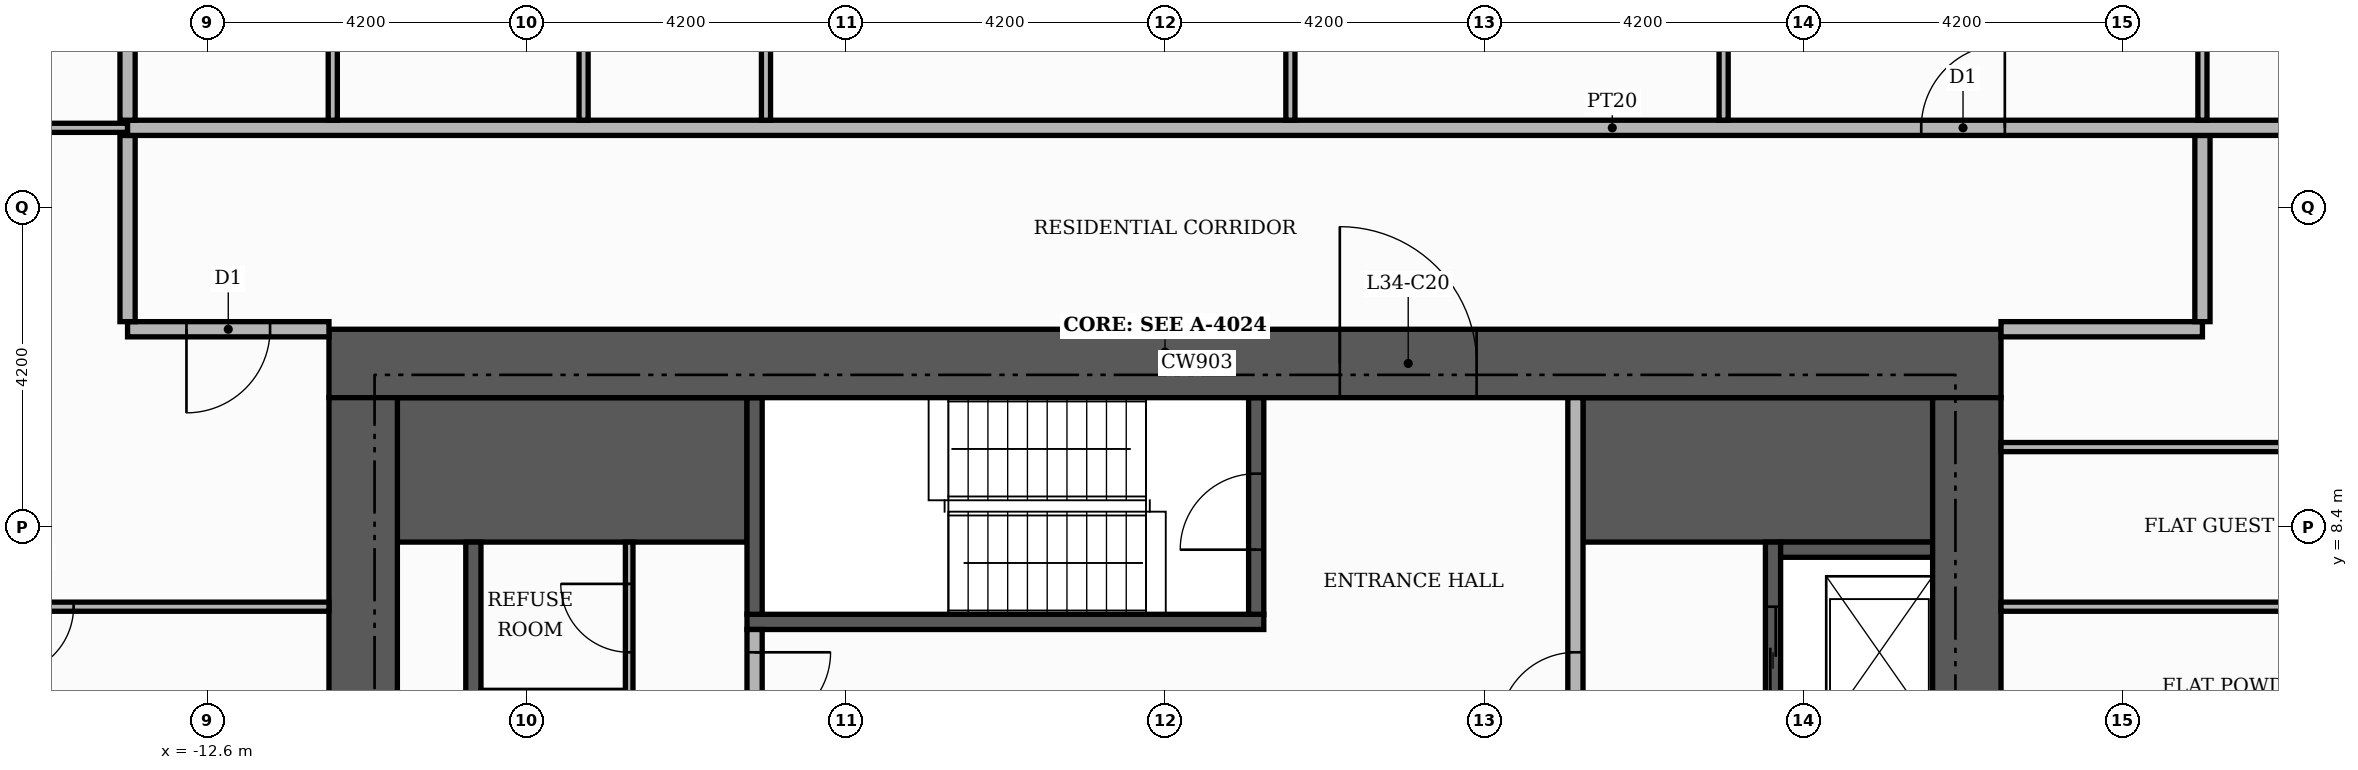
"""IFC4 building model, lengths in metres.
Left out: names, types, materials, properties, quantities, classifications, styles, units other than length and angle.
Written with IfcOpenShell. Run it as: python <this file> out.ifc"""

import sys

from ifc_helpers import new_model, si_unit, direction, frame, frame_2d, origin, place, context, subcontext, project, spatial, rectangle, extrude, element, fill, save


model = new_model("IFC4")
c1 = context("Model", 3, precision=1e-05, world=origin(), true_north=direction((0.0, 1.0)))
c2 = subcontext(c1, "Body", "Model", "MODEL_VIEW")
j1 = project(units=[si_unit("LENGTHUNIT", "METRE"), si_unit("PLANEANGLEUNIT", "RADIAN")], contexts=[c1])
p1 = place(None, origin())
s1 = spatial("IfcSite", under=j1, at=p1, CompositionType="ELEMENT")
p2 = place(p1, origin())
s2 = spatial("IfcBuilding", under=s1, at=p2, CompositionType="ELEMENT")
p3 = place(p2, frame((0.0, 0.0, 145.5)))
s3 = spatial("IfcBuildingStorey", under=s2, at=p3, CompositionType="ELEMENT", Elevation=145.5)
for number, where, z_axis, x_axis in (
    (1, (-10.1, 9.15, 0.0), (0.0, 0.0, 1.0), (1.0, 0.0, 0.0)),
    (2, (5.5, 9.15, 0.0), (0.0, 0.0, 1.0), (1.0, 0.0, 0.0)),
):
    element("IfcWall", number, at=place(p3, frame(where, z_axis=z_axis, x_axis=x_axis)), inside=s3, PredefinedType="SHEAR", context=c2, shape_type="SweptSolid", body=[
        extrude(rectangle(XDim=4.6, YDim=1.9, at=frame_2d((2.3, 0.0))), origin(), (0.0, 0.0, 1.0), 3.48),
    ])
p4 = place(p3, frame((-5.5, 7.15, 0.0), z_axis=(0.0, 0.0, 1.0), x_axis=(1.0, 0.0, 0.0)))
e3 = element("IfcWall", 3, at=p4, inside=s3, PredefinedType="SHEAR", context=c2, shape_type="SweptSolid", body=[
    extrude(rectangle(XDim=6.8, YDim=0.2, at=frame_2d((3.4, 0.0))), origin(), (0.0, 0.0, 1.0), 3.48),
])
p5 = place(p3, frame((-5.4, 7.25, 0.0), z_axis=(0.0, 0.0, 1.0), x_axis=(0.0, 1.0, 0.0)))
e4 = element("IfcWall", 4, at=p5, inside=s3, PredefinedType="SHEAR", context=c2, shape_type="SweptSolid", body=[
    extrude(rectangle(XDim=2.85, YDim=0.2, at=frame_2d((1.425, 0.0))), origin(), (0.0, 0.0, 1.0), 3.48),
])
p6 = place(p3, frame((1.2, 7.25, 0.0), z_axis=(0.0, 0.0, 1.0), x_axis=(0.0, 1.0, 0.0)))
e5 = element("IfcWall", 5, at=p6, inside=s3, PredefinedType="SHEAR", context=c2, shape_type="SweptSolid", body=[
    extrude(rectangle(XDim=2.85, YDim=0.2, at=frame_2d((1.425, 0.0))), origin(), (0.0, 0.0, 1.0), 3.48),
])
p7 = place(p6, frame((0.85, 0.0, 0.0)))
e6 = element("IfcOpeningElement", 6, at=p7, cuts=e5, PredefinedType="OPENING", context=c2, shape_type="SweptSolid", body=[
    extrude(rectangle(XDim=1.0, YDim=2.1, at=frame_2d((0.5, 1.05))), frame((0.0, 0.11, 0.0), z_axis=(0.0, -1.0, 0.0), x_axis=(1.0, 0.0, 0.0)), (0.0, 0.0, 1.0), 0.22),
])
p8 = place(p3, frame((-9.1, -8.2, 0.0), z_axis=(0.0, 0.0, 1.0), x_axis=(0.0, 1.0, 0.0)))
e7 = element("IfcWall", 7, at=p8, inside=s3, PredefinedType="SHEAR", context=c2, shape_type="SweptSolid", body=[
    extrude(rectangle(XDim=16.4, YDim=0.2, at=frame_2d((8.2, 0.0))), origin(), (0.0, 0.0, 1.0), 3.48),
])
p9 = place(p3, frame((8.0, -8.2, 0.0), z_axis=(0.0, 0.0, 1.0), x_axis=(0.0, 1.0, 0.0)))
e8 = element("IfcWall", 8, at=p9, inside=s3, PredefinedType="SHEAR", context=c2, shape_type="SweptSolid", body=[
    extrude(rectangle(XDim=16.4, YDim=0.2, at=frame_2d((8.2, 0.0))), origin(), (0.0, 0.0, 1.0), 3.48),
])
p10 = place(p9, frame((0.85, 0.0, 0.0)))
e9 = element("IfcOpeningElement", 9, at=p10, cuts=e8, PredefinedType="OPENING", context=c2, shape_type="SweptSolid", body=[
    extrude(rectangle(XDim=1.2, YDim=2.1, at=frame_2d((0.6, 1.05))), frame((0.0, 0.11, 0.0), z_axis=(0.0, -1.0, 0.0), x_axis=(1.0, 0.0, 0.0)), (0.0, 0.0, 1.0), 0.22),
])
p11 = place(p9, frame((3.55, 0.0, 0.0)))
e10 = element("IfcOpeningElement", 10, at=p11, cuts=e8, PredefinedType="OPENING", context=c2, shape_type="SweptSolid", body=[
    extrude(rectangle(XDim=1.2, YDim=2.1, at=frame_2d((0.6, 1.05))), frame((0.0, 0.11, 0.0), z_axis=(0.0, -1.0, 0.0), x_axis=(1.0, 0.0, 0.0)), (0.0, 0.0, 1.0), 0.22),
])
p12 = place(p9, frame((6.25, 0.0, 0.0)))
e11 = element("IfcOpeningElement", 11, at=p12, cuts=e8, PredefinedType="OPENING", context=c2, shape_type="SweptSolid", body=[
    extrude(rectangle(XDim=1.2, YDim=2.1, at=frame_2d((0.6, 1.05))), frame((0.0, 0.11, 0.0), z_axis=(0.0, -1.0, 0.0), x_axis=(1.0, 0.0, 0.0)), (0.0, 0.0, 1.0), 0.22),
])
p13 = place(p9, frame((8.95, 0.0, 0.0)))
e12 = element("IfcOpeningElement", 12, at=p13, cuts=e8, PredefinedType="OPENING", context=c2, shape_type="SweptSolid", body=[
    extrude(rectangle(XDim=1.2, YDim=2.1, at=frame_2d((0.6, 1.05))), frame((0.0, 0.11, 0.0), z_axis=(0.0, -1.0, 0.0), x_axis=(1.0, 0.0, 0.0)), (0.0, 0.0, 1.0), 0.22),
])
p14 = place(p9, frame((11.65, 0.0, 0.0)))
e13 = element("IfcOpeningElement", 13, at=p14, cuts=e8, PredefinedType="OPENING", context=c2, shape_type="SweptSolid", body=[
    extrude(rectangle(XDim=1.2, YDim=2.1, at=frame_2d((0.6, 1.05))), frame((0.0, 0.11, 0.0), z_axis=(0.0, -1.0, 0.0), x_axis=(1.0, 0.0, 0.0)), (0.0, 0.0, 1.0), 0.22),
])
p15 = place(p9, frame((14.35, 0.0, 0.0)))
e14 = element("IfcOpeningElement", 14, at=p15, cuts=e8, PredefinedType="OPENING", context=c2, shape_type="SweptSolid", body=[
    extrude(rectangle(XDim=1.2, YDim=2.1, at=frame_2d((0.6, 1.05))), frame((0.0, 0.11, 0.0), z_axis=(0.0, -1.0, 0.0), x_axis=(1.0, 0.0, 0.0)), (0.0, 0.0, 1.0), 0.22),
])
p16 = place(p3, frame((8.1, 8.1, 0.0), z_axis=(0.0, 0.0, 1.0), x_axis=(1.0, 0.0, 0.0)))
e15 = element("IfcWall", 15, at=p16, inside=s3, PredefinedType="SHEAR", context=c2, shape_type="SweptSolid", body=[
    extrude(rectangle(XDim=2.0, YDim=0.2, at=frame_2d((1.0, 0.0))), origin(), (0.0, 0.0, 1.0), 3.48),
])
p17 = place(p3, frame((-11.0, 10.55, 0.0), z_axis=(0.0, 0.0, 1.0), x_axis=(1.0, 0.0, 0.0)))
e16 = element("IfcWall", 16, at=p17, inside=s3, PredefinedType="SHEAR", context=c2, shape_type="SweptSolid", body=[
    extrude(rectangle(XDim=22.0, YDim=0.9, at=frame_2d((11.0, 0.0))), origin(), (0.0, 0.0, 1.0), 3.48),
])
p18 = place(p17, frame((13.3, 0.0, 0.0)))
e17 = element("IfcOpeningElement", 17, at=p18, cuts=e16, PredefinedType="OPENING", context=c2, shape_type="SweptSolid", body=[
    extrude(rectangle(XDim=1.8, YDim=2.2, at=frame_2d((0.9, 1.1))), frame((0.0, 0.46, 0.0), z_axis=(0.0, -1.0, 0.0), x_axis=(1.0, 0.0, 0.0)), (0.0, 0.0, 1.0), 0.92),
])
for number, where, z_axis, x_axis in (
    (18, (-10.55, -10.1, 0.0), (0.0, 0.0, 1.0), (0.0, 1.0, 0.0)),
    (19, (10.55, -10.1, 0.0), (0.0, 0.0, 1.0), (0.0, 1.0, 0.0)),
):
    element("IfcWall", number, at=place(p3, frame(where, z_axis=z_axis, x_axis=x_axis)), inside=s3, PredefinedType="SHEAR", context=c2, shape_type="SweptSolid", body=[
        extrude(rectangle(XDim=20.2, YDim=0.9, at=frame_2d((10.1, 0.0))), origin(), (0.0, 0.0, 1.0), 3.48),
    ])
p19 = place(p3, frame((-7.05, -8.2, 0.0), z_axis=(0.0, 0.0, 1.0), x_axis=(0.0, 1.0, 0.0)))
e20 = element("IfcWall", 20, at=p19, inside=s3, PredefinedType="PARTITIONING", context=c2, shape_type="SweptSolid", body=[
    extrude(rectangle(XDim=16.4, YDim=0.1, at=frame_2d((8.2, 0.0))), origin(), (0.0, 0.0, 1.0), 3.48),
])
p20 = place(p19, frame((0.5, 0.0, 0.0)))
e21 = element("IfcOpeningElement", 21, at=p20, cuts=e20, PredefinedType="OPENING", context=c2, shape_type="SweptSolid", body=[
    extrude(rectangle(XDim=1.0, YDim=2.1, at=frame_2d((0.5, 1.05))), frame((0.0, 0.06, 0.0), z_axis=(0.0, -1.0, 0.0), x_axis=(1.0, 0.0, 0.0)), (0.0, 0.0, 1.0), 0.12),
])
p21 = place(p19, frame((3.25, 0.0, 0.0)))
e22 = element("IfcOpeningElement", 22, at=p21, cuts=e20, PredefinedType="OPENING", context=c2, shape_type="SweptSolid", body=[
    extrude(rectangle(XDim=0.9, YDim=2.1, at=frame_2d((0.45, 1.05))), frame((0.0, 0.06, 0.0), z_axis=(0.0, -1.0, 0.0), x_axis=(1.0, 0.0, 0.0)), (0.0, 0.0, 1.0), 0.12),
])
p22 = place(p19, frame((6.65, 0.0, 0.0)))
e23 = element("IfcOpeningElement", 23, at=p22, cuts=e20, PredefinedType="OPENING", context=c2, shape_type="SweptSolid", body=[
    extrude(rectangle(XDim=0.9, YDim=2.1, at=frame_2d((0.45, 1.05))), frame((0.0, 0.06, 0.0), z_axis=(0.0, -1.0, 0.0), x_axis=(1.0, 0.0, 0.0)), (0.0, 0.0, 1.0), 0.12),
])
p23 = place(p19, frame((10.15, 0.0, 0.0)))
e24 = element("IfcOpeningElement", 24, at=p23, cuts=e20, PredefinedType="OPENING", context=c2, shape_type="SweptSolid", body=[
    extrude(rectangle(XDim=0.9, YDim=2.1, at=frame_2d((0.45, 1.05))), frame((0.0, 0.06, 0.0), z_axis=(0.0, -1.0, 0.0), x_axis=(1.0, 0.0, 0.0)), (0.0, 0.0, 1.0), 0.12),
])
p24 = place(p19, frame((12.95, 0.0, 0.0)))
e25 = element("IfcOpeningElement", 25, at=p24, cuts=e20, PredefinedType="OPENING", context=c2, shape_type="SweptSolid", body=[
    extrude(rectangle(XDim=0.9, YDim=2.1, at=frame_2d((0.45, 1.05))), frame((0.0, 0.06, 0.0), z_axis=(0.0, -1.0, 0.0), x_axis=(1.0, 0.0, 0.0)), (0.0, 0.0, 1.0), 0.12),
])
p25 = place(p19, frame((14.95, 0.0, 0.0)))
e26 = element("IfcOpeningElement", 26, at=p25, cuts=e20, PredefinedType="OPENING", context=c2, shape_type="SweptSolid", body=[
    extrude(rectangle(XDim=0.9, YDim=2.1, at=frame_2d((0.45, 1.05))), frame((0.0, 0.06, 0.0), z_axis=(0.0, -1.0, 0.0), x_axis=(1.0, 0.0, 0.0)), (0.0, 0.0, 1.0), 0.12),
])
p26 = place(p3, frame((-5.4, 5.5, 0.0), z_axis=(0.0, 0.0, 1.0), x_axis=(0.0, 1.0, 0.0)))
e27 = element("IfcWall", 27, at=p26, inside=s3, PredefinedType="PARTITIONING", context=c2, shape_type="SweptSolid", body=[
    extrude(rectangle(XDim=1.55, YDim=0.2, at=frame_2d((0.775, 0.0))), origin(), (0.0, 0.0, 1.0), 3.48),
])
p27 = place(p26, frame((0.25, 0.0, 0.0)))
e28 = element("IfcOpeningElement", 28, at=p27, cuts=e27, PredefinedType="OPENING", context=c2, shape_type="SweptSolid", body=[
    extrude(rectangle(XDim=1.0, YDim=2.1, at=frame_2d((0.5, 1.05))), frame((0.0, 0.11, 0.0), z_axis=(0.0, -1.0, 0.0), x_axis=(1.0, 0.0, 0.0)), (0.0, 0.0, 1.0), 0.22),
])
p28 = place(p3, frame((5.4, 5.5, 0.0), z_axis=(0.0, 0.0, 1.0), x_axis=(0.0, 1.0, 0.0)))
e29 = element("IfcWall", 29, at=p28, inside=s3, PredefinedType="PARTITIONING", context=c2, shape_type="SweptSolid", body=[
    extrude(rectangle(XDim=4.6, YDim=0.2, at=frame_2d((2.3, 0.0))), origin(), (0.0, 0.0, 1.0), 3.48),
])
p29 = place(p28, frame((0.25, 0.0, 0.0)))
e30 = element("IfcOpeningElement", 30, at=p29, cuts=e29, PredefinedType="OPENING", context=c2, shape_type="SweptSolid", body=[
    extrude(rectangle(XDim=1.0, YDim=2.1, at=frame_2d((0.5, 1.05))), frame((0.0, 0.11, 0.0), z_axis=(0.0, -1.0, 0.0), x_axis=(1.0, 0.0, 0.0)), (0.0, 0.0, 1.0), 0.22),
])
p30 = place(p3, frame((-18.62, 7.35, 0.0), z_axis=(0.0, 0.0, 1.0), x_axis=(1.0, 0.0, 0.0)))
e31 = element("IfcWall", 31, at=p30, inside=s3, PredefinedType="PARTITIONING", context=c2, shape_type="SweptSolid", body=[
    extrude(rectangle(XDim=7.62, YDim=0.12, at=frame_2d((3.81, 0.0))), origin(), (0.0, 0.0, 1.0), 3.48),
])
p31 = place(p30, frame((3.36, 0.0, 0.0)))
e32 = element("IfcOpeningElement", 32, at=p31, cuts=e31, PredefinedType="OPENING", context=c2, shape_type="SweptSolid", body=[
    extrude(rectangle(XDim=0.9, YDim=2.1, at=frame_2d((0.45, 1.05))), frame((0.0, 0.07, 0.0), z_axis=(0.0, -1.0, 0.0), x_axis=(1.0, 0.0, 0.0)), (0.0, 0.0, 1.0), 0.14),
])
for number, where, z_axis, x_axis in (
    (33, (11.0, 7.35, 0.0), (0.0, 0.0, 1.0), (1.0, 0.0, 0.0)),
    (34, (11.0, 9.45, 0.0), (0.0, 0.0, 1.0), (1.0, 0.0, 0.0)),
):
    element("IfcWall", number, at=place(p3, frame(where, z_axis=z_axis, x_axis=x_axis)), inside=s3, PredefinedType="PARTITIONING", context=c2, shape_type="SweptSolid", body=[
        extrude(rectangle(XDim=7.92, YDim=0.12, at=frame_2d((3.96, 0.0))), origin(), (0.0, 0.0, 1.0), 3.48),
    ])
p32 = place(p3, frame((-13.65, 11.0, 0.0), z_axis=(0.0, 0.0, 1.0), x_axis=(1.0, 0.0, 0.0)))
e35 = element("IfcWall", 35, at=p32, inside=s3, PredefinedType="PARTITIONING", context=c2, shape_type="SweptSolid", body=[
    extrude(rectangle(XDim=2.65, YDim=0.2, at=frame_2d((1.325, 0.0))), origin(), (0.0, 0.0, 1.0), 3.48),
])
p33 = place(p32, frame((0.775, 0.0, 0.0)))
e36 = element("IfcOpeningElement", 36, at=p33, cuts=e35, PredefinedType="OPENING", context=c2, shape_type="SweptSolid", body=[
    extrude(rectangle(XDim=1.1, YDim=2.4, at=frame_2d((0.55, 1.2))), frame((0.0, 0.11, 0.0), z_axis=(0.0, -1.0, 0.0), x_axis=(1.0, 0.0, 0.0)), (0.0, 0.0, 1.0), 0.22),
])
p34 = place(p3, frame((11.0, 11.0, 0.0), z_axis=(0.0, 0.0, 1.0), x_axis=(1.0, 0.0, 0.0)))
e37 = element("IfcWall", 37, at=p34, inside=s3, PredefinedType="PARTITIONING", context=c2, shape_type="SweptSolid", body=[
    extrude(rectangle(XDim=2.65, YDim=0.2, at=frame_2d((1.325, 0.0))), origin(), (0.0, 0.0, 1.0), 3.48),
])
for number, where, z_axis, x_axis in (
    (38, (-13.65, 11.1, 0.0), (0.0, 0.0, 1.0), (0.0, 1.0, 0.0)),
    (39, (13.65, 11.1, 0.0), (0.0, 0.0, 1.0), (0.0, 1.0, 0.0)),
):
    element("IfcWall", number, at=place(p3, frame(where, z_axis=z_axis, x_axis=x_axis)), inside=s3, PredefinedType="PARTITIONING", context=c2, shape_type="SweptSolid", body=[
        extrude(rectangle(XDim=2.45, YDim=0.2, at=frame_2d((1.225, 0.0))), origin(), (0.0, 0.0, 1.0), 3.48),
    ])
p35 = place(p3, frame((-20.12, 13.65, 0.0), z_axis=(0.0, 0.0, 1.0), x_axis=(1.0, 0.0, 0.0)))
e40 = element("IfcWall", 40, at=p35, inside=s3, PredefinedType="PARTITIONING", context=c2, shape_type="SweptSolid", body=[
    extrude(rectangle(XDim=6.47, YDim=0.12, at=frame_2d((3.235, 0.0))), origin(), (0.0, 0.0, 1.0), 3.48),
])
p36 = place(p35, frame((2.785, 0.0, 0.0)))
e41 = element("IfcOpeningElement", 41, at=p36, cuts=e40, PredefinedType="OPENING", context=c2, shape_type="SweptSolid", body=[
    extrude(rectangle(XDim=0.9, YDim=2.1, at=frame_2d((0.45, 1.05))), frame((0.0, 0.07, 0.0), z_axis=(0.0, -1.0, 0.0), x_axis=(1.0, 0.0, 0.0)), (0.0, 0.0, 1.0), 0.14),
])
p37 = place(p3, frame((-13.65, 13.65, 0.0), z_axis=(0.0, 0.0, 1.0), x_axis=(1.0, 0.0, 0.0)))
e42 = element("IfcWall", 42, at=p37, inside=s3, PredefinedType="PARTITIONING", context=c2, shape_type="SweptSolid", body=[
    extrude(rectangle(XDim=39.07, YDim=0.2, at=frame_2d((19.535, 0.0))), origin(), (0.0, 0.0, 1.0), 3.48),
])
p38 = place(p37, frame((23.6, 0.0, 0.0)))
e43 = element("IfcOpeningElement", 43, at=p38, cuts=e42, PredefinedType="OPENING", context=c2, shape_type="SweptSolid", body=[
    extrude(rectangle(XDim=1.1, YDim=2.4, at=frame_2d((0.55, 1.2))), frame((0.0, 0.11, 0.0), z_axis=(0.0, -1.0, 0.0), x_axis=(1.0, 0.0, 0.0)), (0.0, 0.0, 1.0), 0.22),
])
p39 = place(p3, frame((-13.65, 13.75, 0.0), z_axis=(0.0, 0.0, 1.0), x_axis=(0.0, 1.0, 0.0)))
e44 = element("IfcWall", 44, at=p39, inside=s3, PredefinedType="PARTITIONING", context=c2, shape_type="SweptSolid", body=[
    extrude(rectangle(XDim=11.67, YDim=0.2, at=frame_2d((5.835, 0.0))), origin(), (0.0, 0.0, 1.0), 3.48),
])
for number, where, z_axis, x_axis in (
    (45, (-10.95, 13.75, 0.0), (0.0, 0.0, 1.0), (0.0, 1.0, 0.0)),
    (46, (-7.65, 13.75, 0.0), (0.0, 0.0, 1.0), (0.0, 1.0, 0.0)),
    (47, (-5.25, 13.75, 0.0), (0.0, 0.0, 1.0), (0.0, 1.0, 0.0)),
    (48, (1.65, 13.75, 0.0), (0.0, 0.0, 1.0), (0.0, 1.0, 0.0)),
    (49, (7.35, 13.75, 0.0), (0.0, 0.0, 1.0), (0.0, 1.0, 0.0)),
):
    element("IfcWall", number, at=place(p3, frame(where, z_axis=z_axis, x_axis=x_axis)), inside=s3, PredefinedType="PARTITIONING", context=c2, shape_type="SweptSolid", body=[
        extrude(rectangle(XDim=5.11, YDim=0.12, at=frame_2d((2.555, 0.0))), origin(), (0.0, 0.0, 1.0), 3.48),
    ])
p40 = place(p3, frame((13.65, 13.75, 0.0), z_axis=(0.0, 0.0, 1.0), x_axis=(0.0, 1.0, 0.0)))
e50 = element("IfcWall", 50, at=p40, inside=s3, PredefinedType="PARTITIONING", context=c2, shape_type="SweptSolid", body=[
    extrude(rectangle(XDim=6.61, YDim=0.12, at=frame_2d((3.305, 0.0))), origin(), (0.0, 0.0, 1.0), 3.48),
])
p41 = place(p40, frame((2.835, 0.0, 0.0)))
e51 = element("IfcOpeningElement", 51, at=p41, cuts=e50, PredefinedType="OPENING", context=c2, shape_type="SweptSolid", body=[
    extrude(rectangle(XDim=0.9, YDim=2.1, at=frame_2d((0.45, 1.05))), frame((0.0, 0.07, 0.0), z_axis=(0.0, -1.0, 0.0), x_axis=(1.0, 0.0, 0.0)), (0.0, 0.0, 1.0), 0.14),
])
p42 = place(p15, origin())
e52 = element("IfcDoor", 52, at=p42, inside=s3, OperationType="SLIDING_TO_LEFT", PredefinedType="DOOR", context=c2, shape_type="SweptSolid", body=[
    extrude(rectangle(XDim=1.2, YDim=2.1, at=frame_2d((0.6, 1.05))), frame((0.0, 0.025, 0.0), z_axis=(0.0, -1.0, 0.0), x_axis=(1.0, 0.0, 0.0)), (0.0, 0.0, 1.0), 0.05),
])
fill(e14, e52)
p43 = place(p7, origin())
e53 = element("IfcDoor", 53, at=p43, inside=s3, OperationType="SINGLE_SWING_LEFT", PredefinedType="DOOR", context=c2, shape_type="SweptSolid", body=[
    extrude(rectangle(XDim=1.0, YDim=2.1, at=frame_2d((0.5, 1.05))), frame((0.0, 0.025, 0.0), z_axis=(0.0, -1.0, 0.0), x_axis=(1.0, 0.0, 0.0)), (0.0, 0.0, 1.0), 0.05),
])
fill(e6, e53)
p44 = place(p27, frame((1.0, 0.0, 0.0), z_axis=(0.0, 0.0, 1.0), x_axis=(-1.0, 0.0, 0.0)))
e54 = element("IfcDoor", 54, at=p44, inside=s3, OperationType="SINGLE_SWING_RIGHT", PredefinedType="DOOR", context=c2, shape_type="SweptSolid", body=[
    extrude(rectangle(XDim=1.0, YDim=2.1, at=frame_2d((0.5, 1.05))), frame((0.0, 0.025, 0.0), z_axis=(0.0, -1.0, 0.0), x_axis=(1.0, 0.0, 0.0)), (0.0, 0.0, 1.0), 0.05),
])
fill(e28, e54)
p45 = place(p29, origin())
e55 = element("IfcDoor", 55, at=p45, inside=s3, OperationType="SINGLE_SWING_LEFT", PredefinedType="DOOR", context=c2, shape_type="SweptSolid", body=[
    extrude(rectangle(XDim=1.0, YDim=2.1, at=frame_2d((0.5, 1.05))), frame((0.0, 0.025, 0.0), z_axis=(0.0, -1.0, 0.0), x_axis=(1.0, 0.0, 0.0)), (0.0, 0.0, 1.0), 0.05),
])
fill(e30, e55)
p46 = place(p18, origin())
e56 = element("IfcDoor", 56, at=p46, inside=s3, OperationType="DOUBLE_DOOR_SINGLE_SWING", PredefinedType="DOOR", context=c2, shape_type="SweptSolid", body=[
    extrude(rectangle(XDim=1.8, YDim=2.2, at=frame_2d((0.9, 1.1))), frame((0.0, 0.025, 0.0), z_axis=(0.0, -1.0, 0.0), x_axis=(1.0, 0.0, 0.0)), (0.0, 0.0, 1.0), 0.05),
])
fill(e17, e56)
p47 = place(p25, origin())
e57 = element("IfcDoor", 57, at=p47, inside=s3, OperationType="SINGLE_SWING_RIGHT", PredefinedType="DOOR", context=c2, shape_type="SweptSolid", body=[
    extrude(rectangle(XDim=0.9, YDim=2.1, at=frame_2d((0.45, 1.05))), frame((0.0, 0.025, 0.0), z_axis=(0.0, -1.0, 0.0), x_axis=(1.0, 0.0, 0.0)), (0.0, 0.0, 1.0), 0.05),
])
fill(e26, e57)
p48 = place(p38, origin())
e58 = element("IfcDoor", 58, at=p48, inside=s3, OperationType="SINGLE_SWING_RIGHT", PredefinedType="DOOR", context=c2, shape_type="SweptSolid", body=[
    extrude(rectangle(XDim=1.1, YDim=2.4, at=frame_2d((0.55, 1.2))), frame((0.0, 0.025, 0.0), z_axis=(0.0, -1.0, 0.0), x_axis=(1.0, 0.0, 0.0)), (0.0, 0.0, 1.0), 0.05),
])
fill(e43, e58)
p49 = place(p33, frame((1.1, 0.0, 0.0), z_axis=(0.0, 0.0, 1.0), x_axis=(-1.0, 0.0, 0.0)))
e59 = element("IfcDoor", 59, at=p49, inside=s3, OperationType="SINGLE_SWING_LEFT", PredefinedType="DOOR", context=c2, shape_type="SweptSolid", body=[
    extrude(rectangle(XDim=1.1, YDim=2.4, at=frame_2d((0.55, 1.2))), frame((0.0, 0.025, 0.0), z_axis=(0.0, -1.0, 0.0), x_axis=(1.0, 0.0, 0.0)), (0.0, 0.0, 1.0), 0.05),
])
fill(e36, e59)
p50 = place(p31, frame((0.9, 0.0, 0.0), z_axis=(0.0, 0.0, 1.0), x_axis=(-1.0, 0.0, 0.0)))
e60 = element("IfcDoor", 60, at=p50, inside=s3, OperationType="SINGLE_SWING_LEFT", PredefinedType="DOOR", context=c2, shape_type="SweptSolid", body=[
    extrude(rectangle(XDim=0.9, YDim=2.1, at=frame_2d((0.45, 1.05))), frame((0.0, 0.025, 0.0), z_axis=(0.0, -1.0, 0.0), x_axis=(1.0, 0.0, 0.0)), (0.0, 0.0, 1.0), 0.05),
])
fill(e32, e60)
save(model, sys.argv[1])
